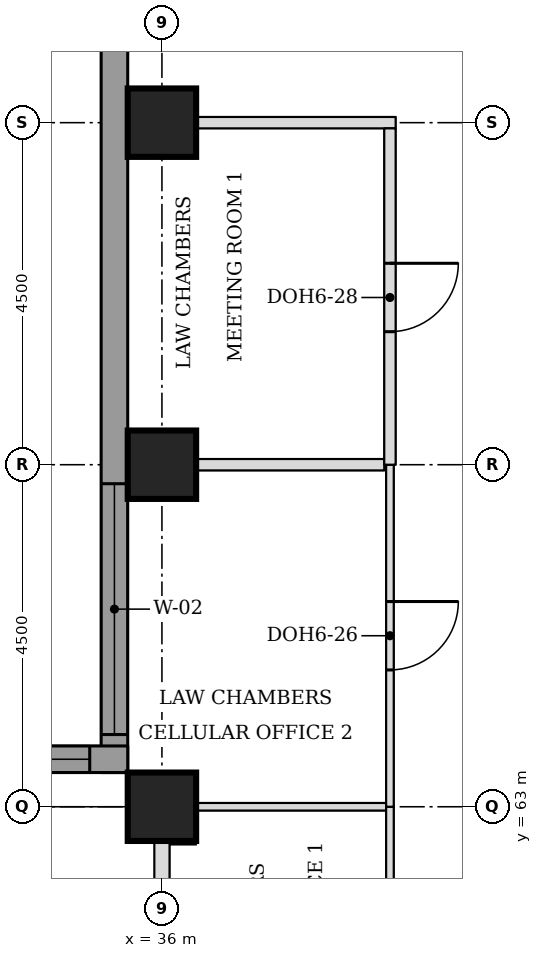
"""IFC4 building model, lengths in metres.
Left out: names, types, materials, properties, quantities, classifications, styles, units other than length and angle.
Written with IfcOpenShell. Run it as: python <this file> out.ifc"""

import sys

from ifc_helpers import new_model, si_unit, direction, frame, frame_2d, origin, origin_2d, place, context, subcontext, project, spatial, rectangle, extrude, element, fill, save


model = new_model("IFC4")
c1 = context("Model", 3, precision=1e-05, world=origin(), true_north=direction((0.0, 1.0)))
c2 = subcontext(c1, "Body", "Model", "MODEL_VIEW")
j1 = project(units=[si_unit("LENGTHUNIT", "METRE"), si_unit("PLANEANGLEUNIT", "RADIAN")], contexts=[c1])
p1 = place(None, origin())
s1 = spatial("IfcSite", under=j1, at=p1, CompositionType="ELEMENT")
p2 = place(p1, origin())
s2 = spatial("IfcBuilding", under=s1, at=p2, CompositionType="ELEMENT")
p3 = place(p2, frame((0.0, 0.0, 188.4)))
s3 = spatial("IfcBuildingStorey", under=s2, at=p3, CompositionType="ELEMENT", Elevation=188.4)
for number, where, z_axis, x_axis in (
    (1, (36.0, 63.0, 0.0), (0.0, 0.0, 1.0), (1.0, 0.0, 0.0)),
    (2, (36.0, 67.5, 0.0), (0.0, 0.0, 1.0), (1.0, 0.0, 0.0)),
    (3, (36.0, 72.0, 0.0), (0.0, 0.0, 1.0), (1.0, 0.0, 0.0)),
):
    element("IfcColumn", number, at=place(p3, frame(where, z_axis=z_axis, x_axis=x_axis)), inside=s3, PredefinedType="COLUMN", context=c2, shape_type="SweptSolid", body=[
        extrude(rectangle(XDim=0.9, YDim=0.9, at=origin_2d()), origin(), (0.0, 0.0, 1.0), 3.7),
    ])
p4 = place(p3, frame((35.375, 76.831, 0.0), z_axis=(0.0, 0.0, 1.0), x_axis=(0.0, -1.0, 0.0)))
e4 = element("IfcWall", 4, at=p4, inside=s3, PredefinedType="STANDARD", context=c2, shape_type="SweptSolid", body=[
    extrude(rectangle(XDim=13.381, YDim=0.35, at=frame_2d((6.691, 0.0))), origin(), (0.0, 0.0, 1.0), 3.525),
])
p5 = place(p4, frame((9.581, 0.0, 0.9)))
e5 = element("IfcOpeningElement", 5, at=p5, cuts=e4, PredefinedType="OPENING", context=c2, shape_type="SweptSolid", body=[
    extrude(rectangle(XDim=3.3, YDim=1.9, at=frame_2d((1.65, 0.95))), frame((0.0, 0.185, 0.0), z_axis=(0.0, -1.0, 0.0), x_axis=(1.0, 0.0, 0.0)), (0.0, 0.0, 1.0), 0.37),
])
p6 = place(p3, frame((35.55, 63.625, 0.0), z_axis=(0.0, 0.0, 1.0), x_axis=(-1.0, 0.0, 0.0)))
e6 = element("IfcWall", 6, at=p6, inside=s3, PredefinedType="STANDARD", context=c2, shape_type="SweptSolid", body=[
    extrude(rectangle(XDim=17.881, YDim=0.35, at=frame_2d((8.941, 0.0))), origin(), (0.0, 0.0, 1.0), 3.525),
])
p7 = place(p6, frame((0.5, 0.0, 0.9)))
e7 = element("IfcOpeningElement", 7, at=p7, cuts=e6, PredefinedType="OPENING", context=c2, shape_type="SweptSolid", body=[
    extrude(rectangle(XDim=3.3, YDim=1.9, at=frame_2d((1.65, 0.95))), frame((0.0, 0.185, 0.0), z_axis=(0.0, -1.0, 0.0), x_axis=(1.0, 0.0, 0.0)), (0.0, 0.0, 1.0), 0.37),
])
p8 = place(p6, frame((9.15, 0.0, 0.9)))
e8 = element("IfcOpeningElement", 8, at=p8, cuts=e6, PredefinedType="OPENING", context=c2, shape_type="SweptSolid", body=[
    extrude(rectangle(XDim=3.3, YDim=1.9, at=frame_2d((1.65, 0.95))), frame((0.0, 0.185, 0.0), z_axis=(0.0, -1.0, 0.0), x_axis=(1.0, 0.0, 0.0)), (0.0, 0.0, 1.0), 0.37),
])
p9 = place(p3, frame((36.45, 63.0, 0.0), z_axis=(0.0, 0.0, 1.0), x_axis=(1.0, 0.0, 0.0)))
e9 = element("IfcWall", 9, at=p9, inside=s3, PredefinedType="PARTITIONING", context=c2, shape_type="SweptSolid", body=[
    extrude(rectangle(XDim=2.5, YDim=0.1, at=frame_2d((1.25, 0.0))), origin(), (0.0, 0.0, 1.0), 3.55),
])
p10 = place(p3, frame((35.55, 67.5, 0.0), z_axis=(0.0, 0.0, 1.0), x_axis=(1.0, 0.0, 0.0)))
e10 = element("IfcWall", 10, at=p10, inside=s3, PredefinedType="PARTITIONING", context=c2, shape_type="SweptSolid", body=[
    extrude(rectangle(XDim=3.375, YDim=0.15, at=frame_2d((1.688, 0.0))), origin(), (0.0, 0.0, 1.0), 3.55),
])
p11 = place(p3, frame((35.55, 72.0, 0.0), z_axis=(0.0, 0.0, 1.0), x_axis=(1.0, 0.0, 0.0)))
e11 = element("IfcWall", 11, at=p11, inside=s3, PredefinedType="PARTITIONING", context=c2, shape_type="SweptSolid", body=[
    extrude(rectangle(XDim=3.525, YDim=0.15, at=frame_2d((1.762, 0.0))), origin(), (0.0, 0.0, 1.0), 3.55),
])
p12 = place(p3, frame((39.0, 58.55, 0.0), z_axis=(0.0, 0.0, 1.0), x_axis=(0.0, 1.0, 0.0)))
e12 = element("IfcWall", 12, at=p12, inside=s3, PredefinedType="PARTITIONING", context=c2, shape_type="SweptSolid", body=[
    extrude(rectangle(XDim=4.45, YDim=0.1, at=frame_2d((2.225, 0.0))), origin(), (0.0, 0.0, 1.0), 3.55),
])
p13 = place(p3, frame((36.0, 60.0, 0.0), z_axis=(0.0, 0.0, 1.0), x_axis=(0.0, 1.0, 0.0)))
e13 = element("IfcWall", 13, at=p13, inside=s3, PredefinedType="PARTITIONING", context=c2, shape_type="SweptSolid", body=[
    extrude(rectangle(XDim=2.55, YDim=0.2, at=frame_2d((1.275, 0.0))), origin(), (0.0, 0.0, 1.0), 2.8),
])
p14 = place(p3, frame((39.0, 63.0, 0.0), z_axis=(0.0, 0.0, 1.0), x_axis=(0.0, 1.0, 0.0)))
e14 = element("IfcWall", 14, at=p14, inside=s3, PredefinedType="PARTITIONING", context=c2, shape_type="SweptSolid", body=[
    extrude(rectangle(XDim=4.5, YDim=0.1, at=frame_2d((2.25, 0.0))), origin(), (0.0, 0.0, 1.0), 3.55),
])
p15 = place(p14, frame((1.8, 0.0, 0.0)))
e15 = element("IfcOpeningElement", 15, at=p15, cuts=e14, PredefinedType="OPENING", context=c2, shape_type="SweptSolid", body=[
    extrude(rectangle(XDim=0.9, YDim=2.1, at=frame_2d((0.45, 1.05))), frame((0.0, 0.06, 0.0), z_axis=(0.0, -1.0, 0.0), x_axis=(1.0, 0.0, 0.0)), (0.0, 0.0, 1.0), 0.12),
])
p16 = place(p3, frame((39.0, 67.5, 0.0), z_axis=(0.0, 0.0, 1.0), x_axis=(0.0, 1.0, 0.0)))
e16 = element("IfcWall", 16, at=p16, inside=s3, PredefinedType="PARTITIONING", context=c2, shape_type="SweptSolid", body=[
    extrude(rectangle(XDim=4.425, YDim=0.15, at=frame_2d((2.212, 0.0))), origin(), (0.0, 0.0, 1.0), 3.55),
])
p17 = place(p16, frame((1.75, 0.0, 0.0)))
e17 = element("IfcOpeningElement", 17, at=p17, cuts=e16, PredefinedType="OPENING", context=c2, shape_type="SweptSolid", body=[
    extrude(rectangle(XDim=0.9, YDim=2.1, at=frame_2d((0.45, 1.05))), frame((0.0, 0.085, 0.0), z_axis=(0.0, -1.0, 0.0), x_axis=(1.0, 0.0, 0.0)), (0.0, 0.0, 1.0), 0.17),
])
p18 = place(p5, origin())
e18 = element("IfcWindow", 18, at=p18, inside=s3, PartitioningType="SINGLE_PANEL", PredefinedType="WINDOW", context=c2, shape_type="SweptSolid", body=[
    extrude(rectangle(XDim=3.3, YDim=1.9, at=frame_2d((1.65, 0.95))), frame((0.0, 0.085, 0.0), z_axis=(0.0, -1.0, 0.0), x_axis=(1.0, 0.0, 0.0)), (0.0, 0.0, 1.0), 0.06),
])
fill(e5, e18)
p19 = place(p7, origin())
e19 = element("IfcWindow", 19, at=p19, inside=s3, PartitioningType="SINGLE_PANEL", PredefinedType="WINDOW", context=c2, shape_type="SweptSolid", body=[
    extrude(rectangle(XDim=3.3, YDim=1.9, at=frame_2d((1.65, 0.95))), frame((0.0, 0.085, 0.0), z_axis=(0.0, -1.0, 0.0), x_axis=(1.0, 0.0, 0.0)), (0.0, 0.0, 1.0), 0.06),
])
fill(e7, e19)
p20 = place(p15, frame((0.9, 0.0, 0.0), z_axis=(0.0, 0.0, 1.0), x_axis=(-1.0, 0.0, 0.0)))
e20 = element("IfcDoor", 20, at=p20, inside=s3, OperationType="SINGLE_SWING_LEFT", PredefinedType="DOOR", context=c2, shape_type="SweptSolid", body=[
    extrude(rectangle(XDim=0.9, YDim=2.1, at=frame_2d((0.45, 1.05))), frame((0.0, 0.025, 0.0), z_axis=(0.0, -1.0, 0.0), x_axis=(1.0, 0.0, 0.0)), (0.0, 0.0, 1.0), 0.05),
])
fill(e15, e20)
p21 = place(p17, frame((0.9, 0.0, 0.0), z_axis=(0.0, 0.0, 1.0), x_axis=(-1.0, 0.0, 0.0)))
e21 = element("IfcDoor", 21, at=p21, inside=s3, OperationType="SINGLE_SWING_LEFT", PredefinedType="DOOR", context=c2, shape_type="SweptSolid", body=[
    extrude(rectangle(XDim=0.9, YDim=2.1, at=frame_2d((0.45, 1.05))), frame((0.0, 0.025, 0.0), z_axis=(0.0, -1.0, 0.0), x_axis=(1.0, 0.0, 0.0)), (0.0, 0.0, 1.0), 0.05),
])
fill(e17, e21)
save(model, sys.argv[1])
